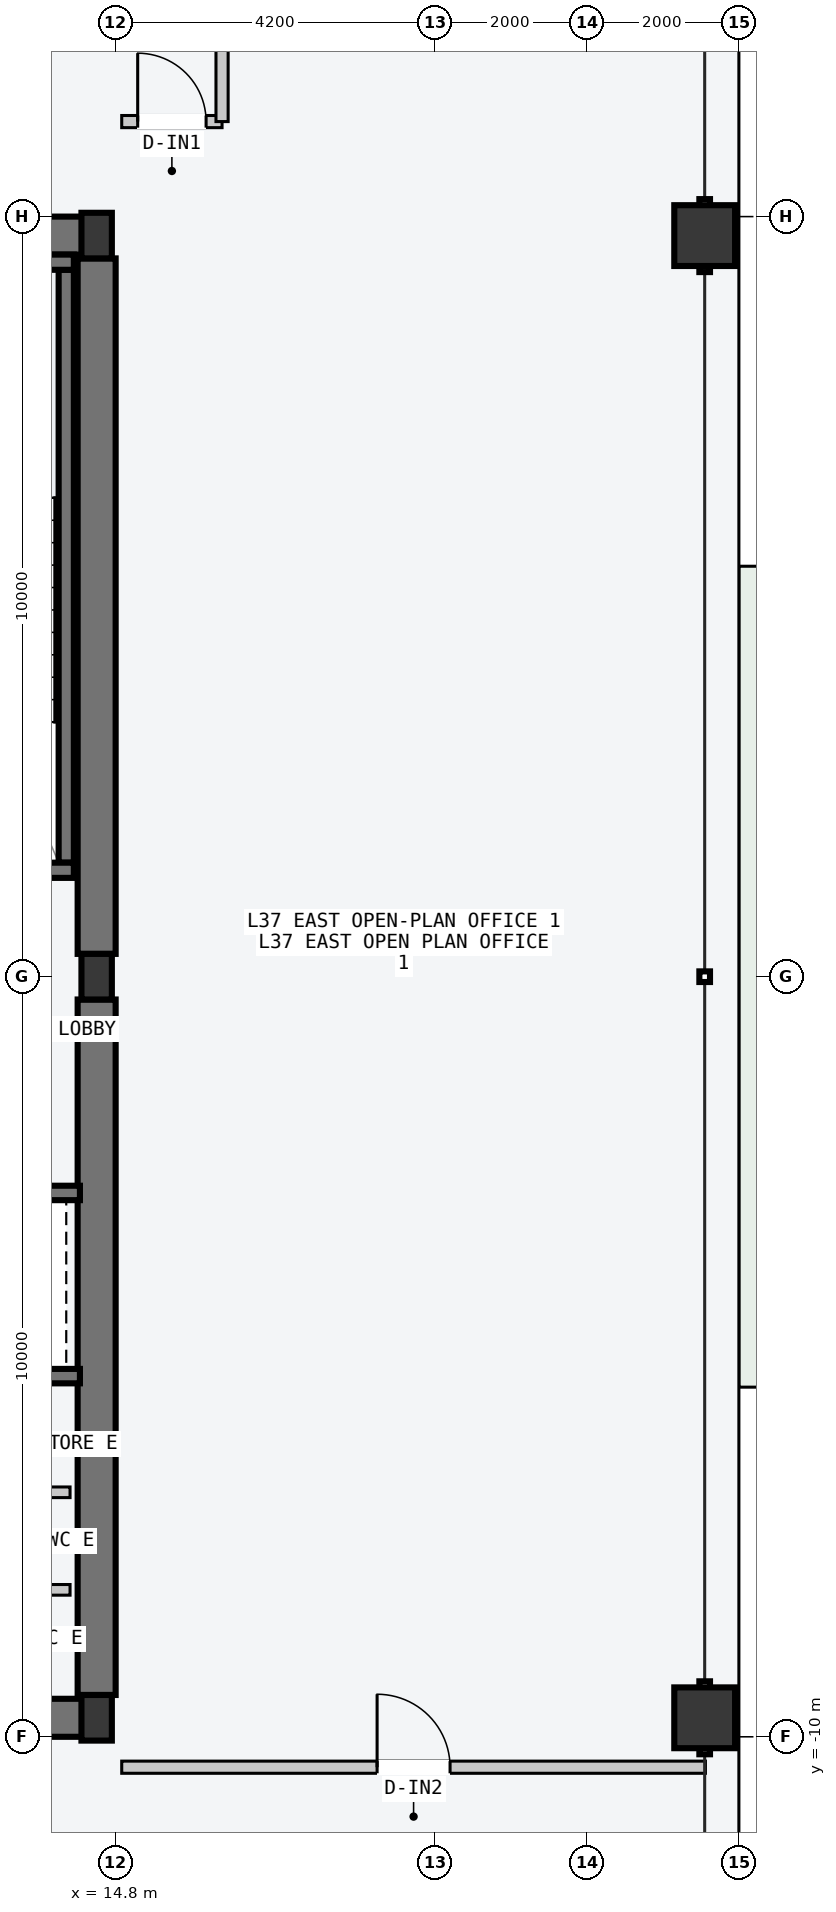
"""IFC4 building model, lengths in metres.
Left out: names, types, materials, properties, quantities, classifications, styles, units other than length and angle.
Written with IfcOpenShell. Run it as: python <this file> out.ifc"""

import sys

from ifc_helpers import new_model, si_unit, direction, frame, frame_2d, origin, origin_2d, place, context, subcontext, project, spatial, rectangle, hollow_rectangle, i_section, extrude, element, fill, save


model = new_model("IFC4")
c1 = context("Model", 3, precision=1e-05, world=origin(), true_north=direction((0.0, 1.0)))
c2 = subcontext(c1, "Body", "Model", "MODEL_VIEW")
j1 = project(units=[si_unit("LENGTHUNIT", "METRE"), si_unit("PLANEANGLEUNIT", "RADIAN")], contexts=[c1])
p1 = place(None, origin())
s1 = spatial("IfcSite", under=j1, at=p1, CompositionType="ELEMENT")
p2 = place(p1, origin())
s2 = spatial("IfcBuilding", under=s1, at=p2, CompositionType="ELEMENT")
p3 = place(p2, frame((0.0, 0.0, 142.2)))
s3 = spatial("IfcBuildingStorey", under=s2, at=p3, CompositionType="ELEMENT", Elevation=142.2)
for number, where, z_axis, x_axis in (
    (1, (8.07, -9.75, -0.2), (0.0, 0.0, 1.0), (1.0, 0.0, 0.0)),
    (2, (8.07, 9.75, -0.2), (0.0, 0.0, 1.0), (1.0, 0.0, 0.0)),
):
    element("IfcWall", number, at=place(p3, frame(where, z_axis=z_axis, x_axis=x_axis)), inside=s3, PredefinedType="SHEAR", context=c2, shape_type="SweptSolid", body=[
        extrude(rectangle(XDim=6.46, YDim=0.5, at=frame_2d((3.23, 0.0))), origin(), (0.0, 0.0, 1.0), 3.6),
    ])
for number, where, z_axis, x_axis in (
    (3, (14.55, -9.45, -0.2), (0.0, 0.0, 1.0), (0.0, 1.0, 0.0)),
    (4, (14.55, 0.3, -0.2), (0.0, 0.0, 1.0), (0.0, 1.0, 0.0)),
):
    element("IfcWall", number, at=place(p3, frame(where, z_axis=z_axis, x_axis=x_axis)), inside=s3, PredefinedType="SHEAR", context=c2, shape_type="SweptSolid", body=[
        extrude(rectangle(XDim=9.15, YDim=0.5, at=frame_2d((4.575, 0.0))), origin(), (0.0, 0.0, 1.0), 3.6),
    ])
p4 = place(p3, frame((14.15, 1.5, -0.2), z_axis=(0.0, 0.0, 1.0), x_axis=(0.0, 1.0, 0.0)))
e5 = element("IfcWall", 5, at=p4, inside=s3, PredefinedType="SOLIDWALL", context=c2, shape_type="SweptSolid", body=[
    extrude(rectangle(XDim=7.8, YDim=0.2, at=frame_2d((3.9, 0.0))), origin(), (0.0, 0.0, 1.0), 3.6),
])
p5 = place(p3, frame((10.15, 1.4, -0.2), z_axis=(0.0, 0.0, 1.0), x_axis=(1.0, 0.0, 0.0)))
e6 = element("IfcWall", 6, at=p5, inside=s3, PredefinedType="SOLIDWALL", context=c2, shape_type="SweptSolid", body=[
    extrude(rectangle(XDim=4.1, YDim=0.2, at=frame_2d((2.05, 0.0))), origin(), (0.0, 0.0, 1.0), 3.6),
])
p6 = place(p5, frame((1.5, 0.0, 0.2)))
e7 = element("IfcOpeningElement", 7, at=p6, cuts=e6, PredefinedType="OPENING", context=c2, shape_type="SweptSolid", body=[
    extrude(rectangle(XDim=1.12, YDim=2.18, at=frame_2d((0.56, 1.09))), frame((0.0, 0.11, 0.0), z_axis=(0.0, -1.0, 0.0), x_axis=(1.0, 0.0, 0.0)), (0.0, 0.0, 1.0), 0.22),
])
p7 = place(p3, frame((10.15, 9.4, -0.2), z_axis=(0.0, 0.0, 1.0), x_axis=(1.0, 0.0, 0.0)))
e8 = element("IfcWall", 8, at=p7, inside=s3, PredefinedType="SOLIDWALL", context=c2, shape_type="SweptSolid", body=[
    extrude(rectangle(XDim=4.1, YDim=0.2, at=frame_2d((2.05, 0.0))), origin(), (0.0, 0.0, 1.0), 3.6),
])
for number, where, z_axis, x_axis in (
    (9, (14.55, -9.75, 0.0), (0.0, 0.0, 1.0), (1.0, 0.0, 0.0)),
    (10, (14.55, 0.0, 0.0), (0.0, 0.0, 1.0), (1.0, 0.0, 0.0)),
    (11, (14.55, 9.75, 0.0), (0.0, 0.0, 1.0), (1.0, 0.0, 0.0)),
):
    element("IfcColumn", number, at=place(p3, frame(where, z_axis=z_axis, x_axis=x_axis)), inside=s3, PredefinedType="COLUMN", context=c2, shape_type="SweptSolid", body=[
        extrude(i_section(OverallWidth=0.4, OverallDepth=0.6, WebThickness=0.022, FlangeThickness=0.036, at=origin_2d()), origin(), (0.0, 0.0, 1.0), 3.6),
    ])
for number, where, z_axis, x_axis in (
    (12, (22.55, -9.75, 0.0), (0.0, 0.0, 1.0), (0.0, 1.0, 0.0)),
    (13, (22.55, 9.75, 0.0), (0.0, 0.0, 1.0), (0.0, 1.0, 0.0)),
):
    element("IfcColumn", number, at=place(p3, frame(where, z_axis=z_axis, x_axis=x_axis)), inside=s3, PredefinedType="COLUMN", context=c2, shape_type="SweptSolid", body=[
        extrude(hollow_rectangle(XDim=0.8, YDim=0.8, WallThickness=0.036, at=origin_2d()), origin(), (0.0, 0.0, 1.0), 3.6),
    ])
p8 = place(p3, frame((11.65, -2.845, -0.2), z_axis=(0.0, 0.0, 1.0), x_axis=(1.0, 0.0, 0.0)))
e14 = element("IfcWall", 14, at=p8, inside=s3, PredefinedType="SOLIDWALL", context=c2, shape_type="SweptSolid", body=[
    extrude(rectangle(XDim=2.68, YDim=0.19, at=frame_2d((1.34, 0.0))), origin(), (0.0, 0.0, 1.0), 3.6),
])
p9 = place(p8, frame((0.65, 0.0, 0.2)))
e15 = element("IfcOpeningElement", 15, at=p9, cuts=e14, PredefinedType="OPENING", context=c2, shape_type="SweptSolid", body=[
    extrude(rectangle(XDim=1.2, YDim=2.2, at=frame_2d((0.6, 1.1))), frame((0.0, 0.105, 0.0), z_axis=(0.0, -1.0, 0.0), x_axis=(1.0, 0.0, 0.0)), (0.0, 0.0, 1.0), 0.21),
])
p10 = place(p3, frame((11.65, -5.255, -0.2), z_axis=(0.0, 0.0, 1.0), x_axis=(1.0, 0.0, 0.0)))
e16 = element("IfcWall", 16, at=p10, inside=s3, PredefinedType="SOLIDWALL", context=c2, shape_type="SweptSolid", body=[
    extrude(rectangle(XDim=2.68, YDim=0.19, at=frame_2d((1.34, 0.0))), origin(), (0.0, 0.0, 1.0), 3.6),
])
for number, where, z_axis, x_axis in (
    (17, (11.7, -8.067, 0.0), (0.0, 0.0, 1.0), (1.0, 0.0, 0.0)),
    (18, (11.7, -6.783, 0.0), (0.0, 0.0, 1.0), (1.0, 0.0, 0.0)),
):
    element("IfcWall", number, at=place(p3, frame(where, z_axis=z_axis, x_axis=x_axis)), inside=s3, PredefinedType="PARTITIONING", context=c2, shape_type="SweptSolid", body=[
        extrude(rectangle(XDim=2.5, YDim=0.14, at=frame_2d((1.25, 0.0))), origin(), (0.0, 0.0, 1.0), 3.4),
    ])
p11 = place(p3, frame((14.88, -10.4, 0.0), z_axis=(0.0, 0.0, 1.0), x_axis=(1.0, 0.0, 0.0)))
e19 = element("IfcWall", 19, at=p11, inside=s3, PredefinedType="PARTITIONING", context=c2, shape_type="SweptSolid", body=[
    extrude(rectangle(XDim=7.68, YDim=0.16, at=frame_2d((3.84, 0.0))), origin(), (0.0, 0.0, 1.0), 3.4),
])
p12 = place(p11, frame((3.36, 0.0, 0.0)))
e20 = element("IfcOpeningElement", 20, at=p12, cuts=e19, PredefinedType="OPENING", context=c2, shape_type="SweptSolid", body=[
    extrude(rectangle(XDim=0.96, YDim=2.18, at=frame_2d((0.48, 1.09))), frame((0.0, 0.09, 0.0), z_axis=(0.0, -1.0, 0.0), x_axis=(1.0, 0.0, 0.0)), (0.0, 0.0, 1.0), 0.18),
])
p13 = place(p3, frame((14.88, 11.25, 0.0), z_axis=(0.0, 0.0, 1.0), x_axis=(1.0, 0.0, 0.0)))
e21 = element("IfcWall", 21, at=p13, inside=s3, PredefinedType="PARTITIONING", context=c2, shape_type="SweptSolid", body=[
    extrude(rectangle(XDim=1.32, YDim=0.16, at=frame_2d((0.66, 0.0))), origin(), (0.0, 0.0, 1.0), 3.4),
])
p14 = place(p13, frame((0.21, 0.0, 0.0)))
e22 = element("IfcOpeningElement", 22, at=p14, cuts=e21, PredefinedType="OPENING", context=c2, shape_type="SweptSolid", body=[
    extrude(rectangle(XDim=0.9, YDim=2.15, at=frame_2d((0.45, 1.075))), frame((0.0, 0.09, 0.0), z_axis=(0.0, -1.0, 0.0), x_axis=(1.0, 0.0, 0.0)), (0.0, 0.0, 1.0), 0.18),
])
p15 = place(p3, frame((16.2, 11.25, 0.0), z_axis=(0.0, 0.0, 1.0), x_axis=(0.0, 1.0, 0.0)))
e23 = element("IfcWall", 23, at=p15, inside=s3, PredefinedType="PARTITIONING", context=c2, shape_type="SweptSolid", body=[
    extrude(rectangle(XDim=1.95, YDim=0.16, at=frame_2d((0.975, 0.0))), origin(), (0.0, 0.0, 1.0), 3.4),
])
p16 = place(p12, origin())
e24 = element("IfcDoor", 24, at=p16, inside=s3, OperationType="SINGLE_SWING_LEFT", PredefinedType="DOOR", context=c2, shape_type="SweptSolid", body=[
    extrude(rectangle(XDim=0.96, YDim=2.18, at=frame_2d((0.48, 1.09))), frame((0.0, 0.025, 0.0), z_axis=(0.0, -1.0, 0.0), x_axis=(1.0, 0.0, 0.0)), (0.0, 0.0, 1.0), 0.05),
])
fill(e20, e24)
p17 = place(p14, origin())
e25 = element("IfcDoor", 25, at=p17, inside=s3, OperationType="SINGLE_SWING_LEFT", PredefinedType="DOOR", context=c2, shape_type="SweptSolid", body=[
    extrude(rectangle(XDim=0.9, YDim=2.15, at=frame_2d((0.45, 1.075))), frame((0.0, 0.025, 0.0), z_axis=(0.0, -1.0, 0.0), x_axis=(1.0, 0.0, 0.0)), (0.0, 0.0, 1.0), 0.05),
])
fill(e22, e25)
save(model, sys.argv[1])
